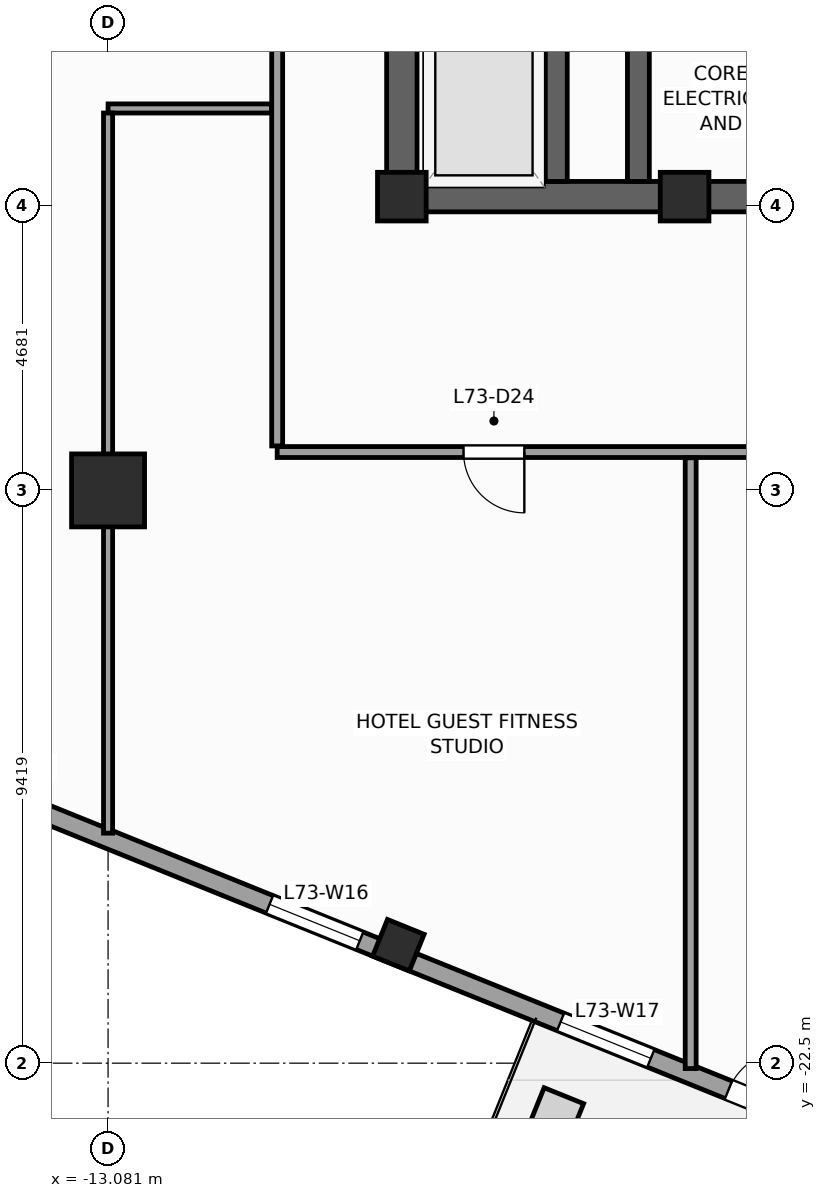
"""IFC4 building model, lengths in metres.
Left out: names, types, materials, properties, quantities, classifications, styles, units other than length and angle.
Written with IfcOpenShell. Run it as: python <this file> out.ifc"""

import sys

from ifc_helpers import new_model, si_unit, direction, frame, frame_2d, origin, origin_2d, place, context, subcontext, project, spatial, rectangle, extrude, source, transform, mapped, element, fill, save


model = new_model("IFC4")
c1 = context("Model", 3, precision=1e-05, world=origin(), true_north=direction((0.0, 1.0)))
c2 = subcontext(c1, "Body", "Model", "MODEL_VIEW")
j1 = project(units=[si_unit("LENGTHUNIT", "METRE"), si_unit("PLANEANGLEUNIT", "RADIAN")], contexts=[c1])
p1 = place(None, origin())
s1 = spatial("IfcSite", under=j1, at=p1, CompositionType="ELEMENT")
p2 = place(p1, origin())
s2 = spatial("IfcBuilding", under=s1, at=p2, CompositionType="ELEMENT")
p3 = place(p2, frame((0.0, 0.0, 297.6)))
s3 = spatial("IfcBuildingStorey", under=s2, at=p3, CompositionType="ELEMENT", Elevation=297.6)
p4 = place(p3, frame((-8.5, -8.25, 0.0), z_axis=(0.0, 0.0, 1.0), x_axis=(1.0, 0.0, 0.0)))
e1 = element("IfcWall", 1, at=p4, inside=s3, PredefinedType="SHEAR", context=c2, shape_type="SweptSolid", body=[
    extrude(rectangle(XDim=17.0, YDim=0.5, at=frame_2d((8.5, 0.0))), origin(), (0.0, 0.0, 1.0), 3.6),
])
p5 = place(p4, frame((7.85, 0.0, 0.0)))
e2 = element("IfcOpeningElement", 2, at=p5, cuts=e1, PredefinedType="OPENING", context=c2, shape_type="SweptSolid", body=[
    extrude(rectangle(XDim=1.3, YDim=2.2, at=frame_2d((0.65, 1.1))), frame((0.0, 0.26, 0.0), z_axis=(0.0, -1.0, 0.0), x_axis=(1.0, 0.0, 0.0)), (0.0, 0.0, 1.0), 0.52),
])
p6 = place(p3, frame((-8.25, -8.0, 0.0), z_axis=(0.0, 0.0, 1.0), x_axis=(0.0, 1.0, 0.0)))
e3 = element("IfcWall", 3, at=p6, inside=s3, PredefinedType="SHEAR", context=c2, shape_type="SweptSolid", body=[
    extrude(rectangle(XDim=16.0, YDim=0.5, at=frame_2d((8.0, 0.0))), origin(), (0.0, 0.0, 1.0), 3.6),
])
p7 = place(p6, frame((4.69, 0.0, 0.0)))
e4 = element("IfcOpeningElement", 4, at=p7, cuts=e3, PredefinedType="OPENING", context=c2, shape_type="SweptSolid", body=[
    extrude(rectangle(XDim=1.3, YDim=2.2, at=frame_2d((0.65, 1.1))), frame((0.0, 0.26, 0.0), z_axis=(0.0, -1.0, 0.0), x_axis=(1.0, 0.0, 0.0)), (0.0, 0.0, 1.0), 0.52),
])
p8 = place(p3, frame((-4.36, -8.0, 0.0), z_axis=(0.0, 0.0, 1.0), x_axis=(0.0, 1.0, 0.0)))
e5 = element("IfcWall", 5, at=p8, inside=s3, PredefinedType="SHEAR", context=c2, shape_type="SweptSolid", body=[
    extrude(rectangle(XDim=16.0, YDim=0.36, at=frame_2d((8.0, 0.0))), origin(), (0.0, 0.0, 1.0), 3.6),
])
p9 = place(p3, frame((-5.71, -8.0, 0.0), z_axis=(0.0, 0.0, 1.0), x_axis=(0.0, 1.0, 0.0)))
e6 = element("IfcWall", 6, at=p9, inside=s3, PredefinedType="SHEAR", context=c2, shape_type="SweptSolid", body=[
    extrude(rectangle(XDim=2.54, YDim=0.36, at=frame_2d((1.27, 0.0))), origin(), (0.0, 0.0, 1.0), 3.6),
])
m1 = source(origin(), c2, "Body", "SweptSolid", [
    extrude(rectangle(XDim=0.8, YDim=0.8, at=origin_2d()), origin(), (0.0, 0.0, 1.0), 3.6),
])
for number, where, z_axis, x_axis in (
    (7, (-8.25, -8.25, 0.0), (0.0, 0.0, 1.0), (1.0, 0.0, 0.0)),
    (8, (-3.6, -8.25, 0.0), (0.0, 0.0, 1.0), (1.0, 0.0, 0.0)),
):
    element("IfcColumn", number, at=place(p3, frame(where, z_axis=z_axis, x_axis=x_axis)), inside=s3, PredefinedType="PILASTER", context=c2, shape_type="MappedRepresentation", body=[
        mapped(m1, transform((0.0, 0.0, 0.0), scale=1.0)),
    ])
m2 = source(origin(), c2, "Body", "SweptSolid", [
    extrude(rectangle(XDim=1.2, YDim=1.2, at=origin_2d()), origin(), (0.0, 0.0, 1.0), 3.6),
])
p10 = place(p3, frame((-13.081, -13.081, 0.0), z_axis=(0.0, 0.0, 1.0), x_axis=(1.0, 0.0, 0.0)))
e9 = element("IfcColumn", 9, at=p10, inside=s3, PredefinedType="COLUMN", context=c2, shape_type="MappedRepresentation", body=[
    mapped(m2, transform((0.0, 0.0, 0.0), scale=1.0)),
])
m3 = source(origin(), c2, "Body", "SweptSolid", [
    extrude(rectangle(XDim=0.65, YDim=0.65, at=origin_2d()), origin(), (0.0, 0.0, 1.0), 3.6),
])
p11 = place(p3, frame((-8.307, -20.56, 0.0), z_axis=(0.0, 0.0, 1.0), x_axis=(0.374606593416, 0.927183854567, 0.0)))
e10 = element("IfcColumn", 10, at=p11, inside=s3, PredefinedType="COLUMN", context=c2, shape_type="MappedRepresentation", body=[
    mapped(m3, transform((0.0, 0.0, 0.0), scale=1.0)),
])
p12 = place(p3, frame((-23.813, -14.479, 0.0), z_axis=(0.0, 0.0, 1.0), x_axis=(0.927182657188, -0.374609557019, 0.0)))
e11 = element("IfcWall", 11, at=p12, inside=s3, PredefinedType="STANDARD", context=c2, shape_type="SweptSolid", body=[
    extrude(rectangle(XDim=33.31, YDim=0.31, at=frame_2d((16.655, 0.0))), origin(), (0.0, 0.0, 1.0), 2.75),
])
p13 = place(p12, frame((22.58, 0.0, 0.0)))
e12 = element("IfcOpeningElement", 12, at=p13, cuts=e11, PredefinedType="OPENING", context=c2, shape_type="SweptSolid", body=[
    extrude(rectangle(XDim=1.05, YDim=2.25, at=frame_2d((0.525, 1.125))), frame((0.0, 0.165, 0.0), z_axis=(0.0, -1.0, 0.0), x_axis=(1.0, 0.0, 0.0)), (0.0, 0.0, 1.0), 0.33),
])
p14 = place(p12, frame((3.197, 0.0, 0.47)))
e13 = element("IfcOpeningElement", 13, at=p14, cuts=e11, PredefinedType="OPENING", context=c2, shape_type="SweptSolid", body=[
    extrude(rectangle(XDim=1.6, YDim=2.1, at=frame_2d((0.8, 1.05))), frame((0.0, 0.165, 0.0), z_axis=(0.0, -1.0, 0.0), x_axis=(1.0, 0.0, 0.0)), (0.0, 0.0, 1.0), 0.33),
])
p15 = place(p12, frame((8.86, 0.0, 0.47)))
e14 = element("IfcOpeningElement", 14, at=p15, cuts=e11, PredefinedType="OPENING", context=c2, shape_type="SweptSolid", body=[
    extrude(rectangle(XDim=1.6, YDim=2.1, at=frame_2d((0.8, 1.05))), frame((0.0, 0.165, 0.0), z_axis=(0.0, -1.0, 0.0), x_axis=(1.0, 0.0, 0.0)), (0.0, 0.0, 1.0), 0.33),
])
p16 = place(p12, frame((14.439, 0.0, 0.47)))
e15 = element("IfcOpeningElement", 15, at=p16, cuts=e11, PredefinedType="OPENING", context=c2, shape_type="SweptSolid", body=[
    extrude(rectangle(XDim=1.6, YDim=2.1, at=frame_2d((0.8, 1.05))), frame((0.0, 0.165, 0.0), z_axis=(0.0, -1.0, 0.0), x_axis=(1.0, 0.0, 0.0)), (0.0, 0.0, 1.0), 0.33),
])
p17 = place(p12, frame((19.601, 0.0, 0.47)))
e16 = element("IfcOpeningElement", 16, at=p17, cuts=e11, PredefinedType="OPENING", context=c2, shape_type="SweptSolid", body=[
    extrude(rectangle(XDim=1.6, YDim=2.1, at=frame_2d((0.8, 1.05))), frame((0.0, 0.165, 0.0), z_axis=(0.0, -1.0, 0.0), x_axis=(1.0, 0.0, 0.0)), (0.0, 0.0, 1.0), 0.33),
])
p18 = place(p12, frame((27.097, 0.0, 0.47)))
e17 = element("IfcOpeningElement", 17, at=p18, cuts=e11, PredefinedType="OPENING", context=c2, shape_type="SweptSolid", body=[
    extrude(rectangle(XDim=1.6, YDim=2.1, at=frame_2d((0.8, 1.05))), frame((0.0, 0.165, 0.0), z_axis=(0.0, -1.0, 0.0), x_axis=(1.0, 0.0, 0.0)), (0.0, 0.0, 1.0), 0.33),
])
p19 = place(p3, frame((-10.3, -12.45, 0.0), z_axis=(0.0, 0.0, 1.0), x_axis=(1.0, 0.0, 0.0)))
e18 = element("IfcWall", 18, at=p19, inside=s3, PredefinedType="PARTITIONING", context=c2, shape_type="SweptSolid", body=[
    extrude(rectangle(XDim=21.65, YDim=0.18, at=frame_2d((10.825, 0.0))), origin(), (0.0, 0.0, 1.0), 3.35),
])
p20 = place(p19, frame((14.786, 0.0, 0.0)))
e19 = element("IfcOpeningElement", 19, at=p20, cuts=e18, PredefinedType="OPENING", context=c2, shape_type="SweptSolid", body=[
    extrude(rectangle(XDim=0.95, YDim=2.1, at=frame_2d((0.475, 1.05))), frame((0.0, 0.1, 0.0), z_axis=(0.0, -1.0, 0.0), x_axis=(1.0, 0.0, 0.0)), (0.0, 0.0, 1.0), 0.2),
])
p21 = place(p19, frame((9.8, 0.0, 0.0)))
e20 = element("IfcOpeningElement", 20, at=p21, cuts=e18, PredefinedType="OPENING", context=c2, shape_type="SweptSolid", body=[
    extrude(rectangle(XDim=1.0, YDim=2.15, at=frame_2d((0.5, 1.075))), frame((0.0, 0.1, 0.0), z_axis=(0.0, -1.0, 0.0), x_axis=(1.0, 0.0, 0.0)), (0.0, 0.0, 1.0), 0.2),
])
p22 = place(p19, frame((3.064, 0.0, 0.0)))
e21 = element("IfcOpeningElement", 21, at=p22, cuts=e18, PredefinedType="OPENING", context=c2, shape_type="SweptSolid", body=[
    extrude(rectangle(XDim=1.0, YDim=2.15, at=frame_2d((0.5, 1.075))), frame((0.0, 0.1, 0.0), z_axis=(0.0, -1.0, 0.0), x_axis=(1.0, 0.0, 0.0)), (0.0, 0.0, 1.0), 0.2),
])
p23 = place(p3, frame((-10.3, -12.35, 0.0), z_axis=(0.0, 0.0, 1.0), x_axis=(0.0, 1.0, 0.0)))
e22 = element("IfcWall", 22, at=p23, inside=s3, PredefinedType="PARTITIONING", context=c2, shape_type="SweptSolid", body=[
    extrude(rectangle(XDim=22.55, YDim=0.18, at=frame_2d((11.275, 0.0))), origin(), (0.0, 0.0, 1.0), 3.35),
])
p24 = place(p23, frame((13.95, 0.0, 0.0)))
e23 = element("IfcOpeningElement", 23, at=p24, cuts=e22, PredefinedType="OPENING", context=c2, shape_type="SweptSolid", body=[
    extrude(rectangle(XDim=1.0, YDim=2.15, at=frame_2d((0.5, 1.075))), frame((0.0, 0.1, 0.0), z_axis=(0.0, -1.0, 0.0), x_axis=(1.0, 0.0, 0.0)), (0.0, 0.0, 1.0), 0.2),
])
p25 = place(p23, frame((17.25, 0.0, 0.0)))
e24 = element("IfcOpeningElement", 24, at=p25, cuts=e22, PredefinedType="OPENING", context=c2, shape_type="SweptSolid", body=[
    extrude(rectangle(XDim=1.0, YDim=2.15, at=frame_2d((0.5, 1.075))), frame((0.0, 0.1, 0.0), z_axis=(0.0, -1.0, 0.0), x_axis=(1.0, 0.0, 0.0)), (0.0, 0.0, 1.0), 0.2),
])
p26 = place(p23, frame((6.65, 0.0, 0.0)))
e25 = element("IfcOpeningElement", 25, at=p26, cuts=e22, PredefinedType="OPENING", context=c2, shape_type="SweptSolid", body=[
    extrude(rectangle(XDim=1.0, YDim=2.15, at=frame_2d((0.5, 1.075))), frame((0.0, 0.1, 0.0), z_axis=(0.0, -1.0, 0.0), x_axis=(1.0, 0.0, 0.0)), (0.0, 0.0, 1.0), 0.2),
])
p27 = place(p23, frame((10.15, 0.0, 0.0)))
e26 = element("IfcOpeningElement", 26, at=p27, cuts=e22, PredefinedType="OPENING", context=c2, shape_type="SweptSolid", body=[
    extrude(rectangle(XDim=1.0, YDim=2.15, at=frame_2d((0.5, 1.075))), frame((0.0, 0.1, 0.0), z_axis=(0.0, -1.0, 0.0), x_axis=(1.0, 0.0, 0.0)), (0.0, 0.0, 1.0), 0.2),
])
p28 = place(p3, frame((-3.5, -12.545, 0.0), z_axis=(0.0, 0.0, 1.0), x_axis=(0.0, -1.0, 0.0)))
e27 = element("IfcWall", 27, at=p28, inside=s3, PredefinedType="PARTITIONING", context=c2, shape_type="SweptSolid", body=[
    extrude(rectangle(XDim=10.044, YDim=0.18, at=frame_2d((5.022, 0.0))), origin(), (0.0, 0.0, 1.0), 3.35),
])
p29 = place(p3, frame((-10.395, -6.8, 0.0), z_axis=(0.0, 0.0, 1.0), x_axis=(-1.0, 0.0, 0.0)))
e28 = element("IfcWall", 28, at=p29, inside=s3, PredefinedType="PARTITIONING", context=c2, shape_type="SweptSolid", body=[
    extrude(rectangle(XDim=2.686, YDim=0.15, at=frame_2d((1.343, 0.0))), origin(), (0.0, 0.0, 1.0), 3.35),
])
p30 = place(p3, frame((-13.081, -6.875, 0.0), z_axis=(0.0, 0.0, 1.0), x_axis=(0.0, -1.0, 0.0)))
e29 = element("IfcWall", 29, at=p30, inside=s3, PredefinedType="PARTITIONING", context=c2, shape_type="SweptSolid", body=[
    extrude(rectangle(XDim=11.843, YDim=0.15, at=frame_2d((5.921, 0.0))), origin(), (0.0, 0.0, 1.0), 2.45),
])
m4 = source(origin(), c2, "Body", "SweptSolid", [
    extrude(rectangle(XDim=1.05, YDim=2.25, at=frame_2d((0.525, 1.125))), frame((0.0, 0.025, 0.0), z_axis=(0.0, -1.0, 0.0), x_axis=(1.0, 0.0, 0.0)), (0.0, 0.0, 1.0), 0.05),
])
p31 = place(p13, origin())
e30 = element("IfcDoor", 30, at=p31, inside=s3, OperationType="SINGLE_SWING_RIGHT", PredefinedType="DOOR", context=c2, shape_type="MappedRepresentation", body=[
    mapped(m4, transform((0.0, 0.0, 0.0), scale=1.0)),
])
fill(e12, e30)
m5 = source(origin(), c2, "Body", "SweptSolid", [
    extrude(rectangle(XDim=1.6, YDim=2.1, at=frame_2d((0.8, 1.05))), frame((0.0, 0.03, 0.0), z_axis=(0.0, -1.0, 0.0), x_axis=(1.0, 0.0, 0.0)), (0.0, 0.0, 1.0), 0.06),
])
p32 = place(p16, origin())
e31 = element("IfcWindow", 31, at=p32, inside=s3, PartitioningType="SINGLE_PANEL", PredefinedType="WINDOW", context=c2, shape_type="MappedRepresentation", body=[
    mapped(m5, transform((0.0, 0.0, 0.0), scale=1.0)),
])
fill(e15, e31)
p33 = place(p17, origin())
e32 = element("IfcWindow", 32, at=p33, inside=s3, PartitioningType="SINGLE_PANEL", PredefinedType="WINDOW", context=c2, shape_type="MappedRepresentation", body=[
    mapped(m5, transform((0.0, 0.0, 0.0), scale=1.0)),
])
fill(e16, e32)
m6 = source(origin(), c2, "Body", "SweptSolid", [
    extrude(rectangle(XDim=1.0, YDim=2.15, at=frame_2d((0.5, 1.075))), frame((0.0, 0.025, 0.0), z_axis=(0.0, -1.0, 0.0), x_axis=(1.0, 0.0, 0.0)), (0.0, 0.0, 1.0), 0.05),
])
p34 = place(p22, frame((1.0, 0.0, 0.0), z_axis=(0.0, 0.0, 1.0), x_axis=(-1.0, 0.0, 0.0)))
e33 = element("IfcDoor", 33, at=p34, inside=s3, OperationType="SINGLE_SWING_RIGHT", PredefinedType="DOOR", context=c2, shape_type="MappedRepresentation", body=[
    mapped(m6, transform((0.0, 0.0, 0.0), scale=1.0)),
])
fill(e21, e33)
save(model, sys.argv[1])
